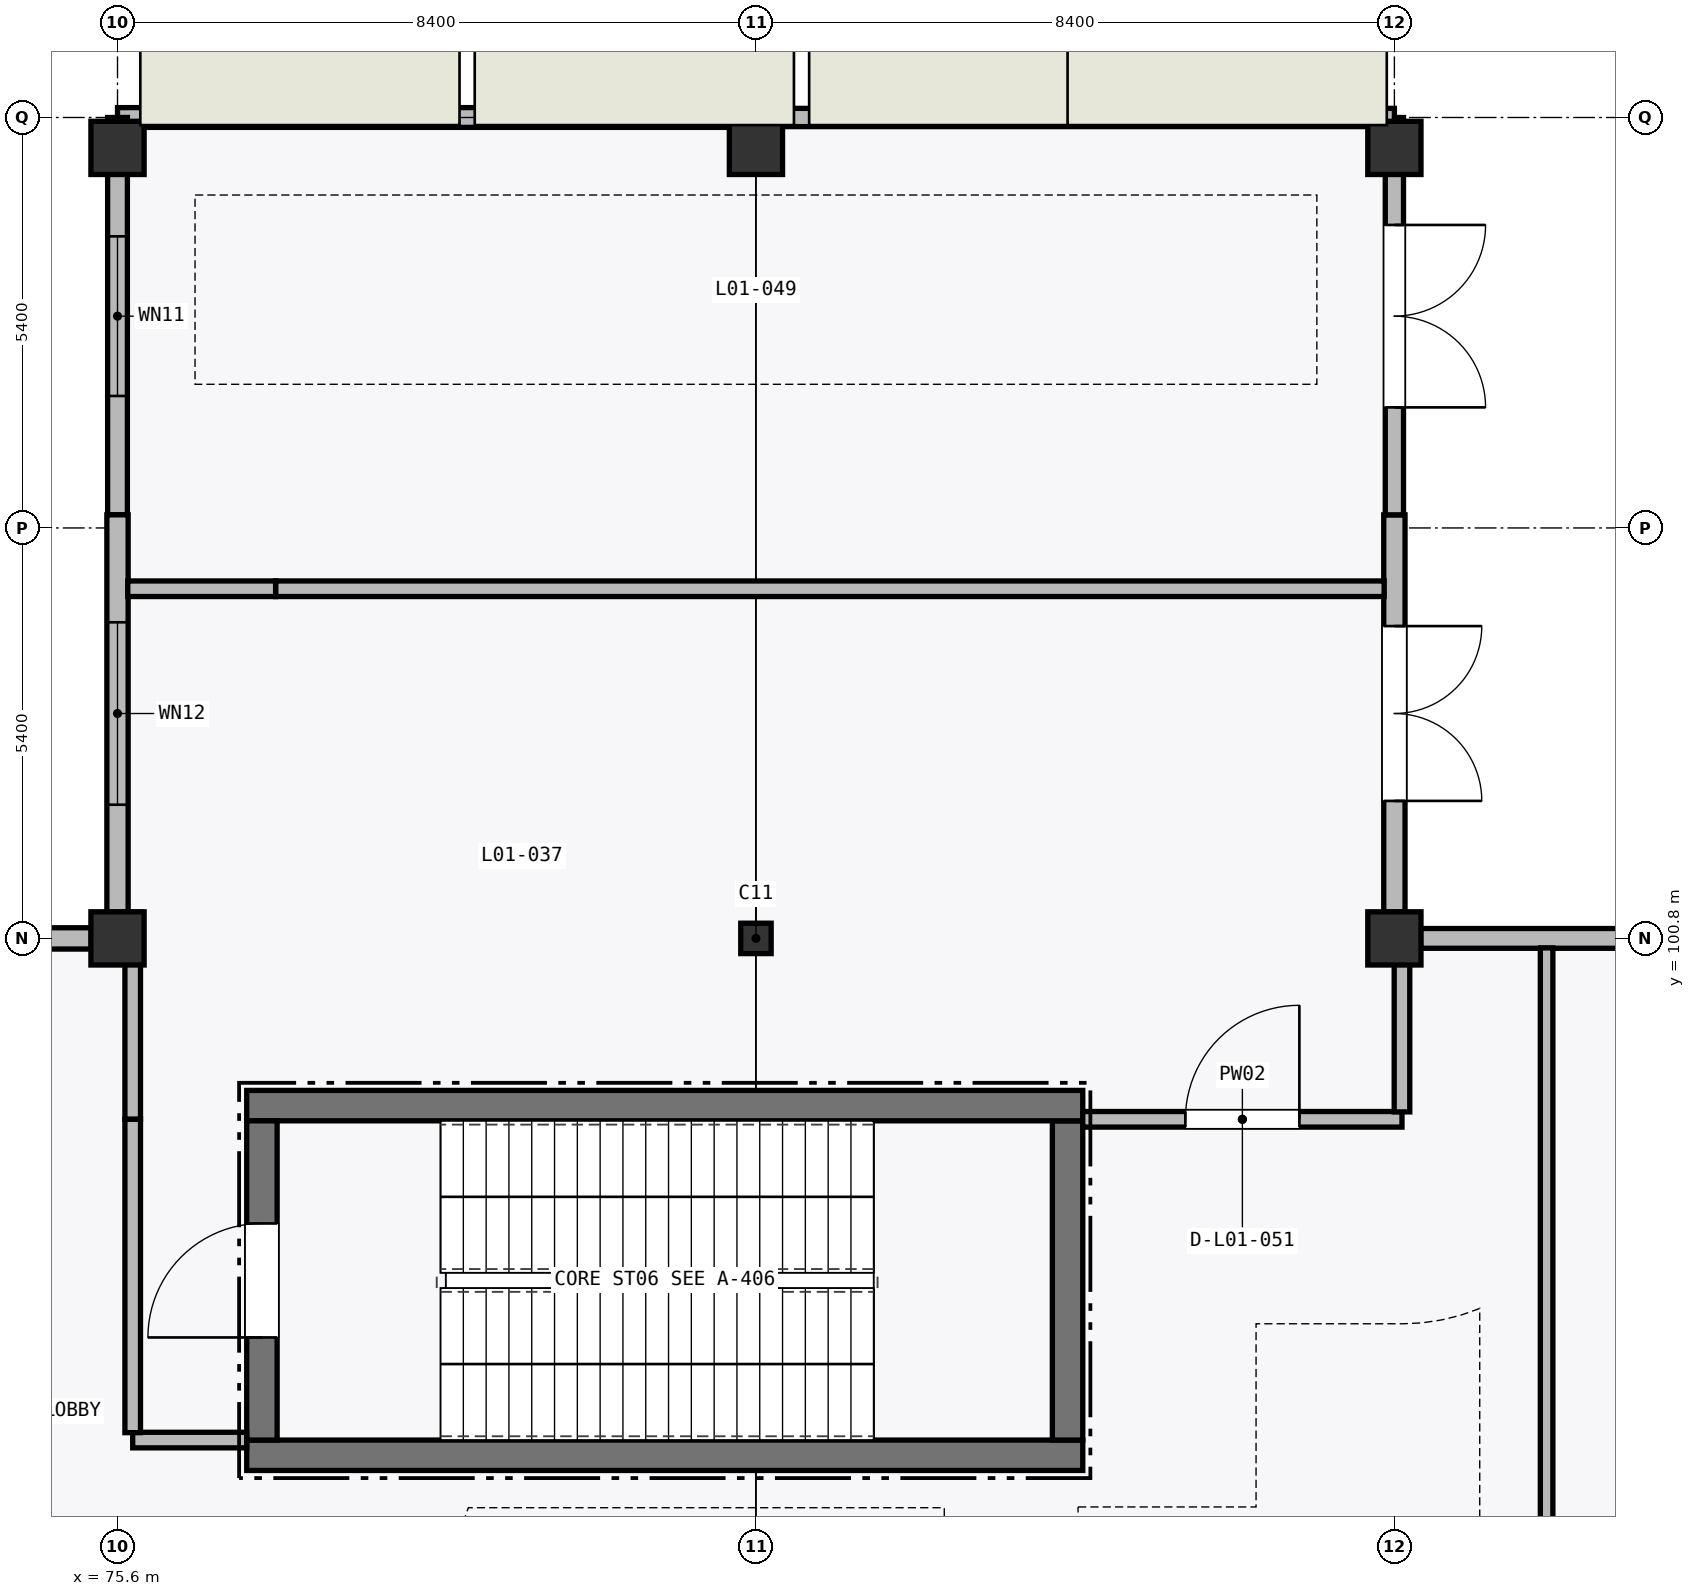
"""IFC4 building model, lengths in metres.
Left out: names, types, materials, properties, quantities, classifications, styles, units other than length and angle.
Written with IfcOpenShell. Run it as: python <this file> out.ifc"""

import sys

from ifc_helpers import new_model, si_unit, direction, frame, frame_2d, origin, origin_2d, place, context, subcontext, project, spatial, rectangle, i_section, extrude, element, fill, save


model = new_model("IFC4")
c1 = context("Model", 3, precision=1e-05, world=origin(), true_north=direction((0.0, 1.0)))
c2 = subcontext(c1, "Body", "Model", "MODEL_VIEW")
j1 = project(units=[si_unit("LENGTHUNIT", "METRE"), si_unit("PLANEANGLEUNIT", "RADIAN")], contexts=[c1])
p1 = place(None, origin())
s1 = spatial("IfcSite", under=j1, at=p1, CompositionType="ELEMENT")
p2 = place(p1, origin())
s2 = spatial("IfcBuilding", under=s1, at=p2, CompositionType="ELEMENT")
p3 = place(p2, origin())
s3 = spatial("IfcBuildingStorey", under=s2, at=p3, CompositionType="ELEMENT", Elevation=0.0)
for number, where, z_axis, x_axis in (
    (1, (75.6, 100.8, 0.0), (0.0, 0.0, 1.0), (1.0, 0.0, 0.0)),
    (2, (75.6, 111.2, 0.0), (0.0, 0.0, 1.0), (1.0, 0.0, 0.0)),
):
    element("IfcColumn", number, at=place(p3, frame(where, z_axis=z_axis, x_axis=x_axis)), inside=s3, PredefinedType="COLUMN", context=c2, shape_type="SweptSolid", body=[
        extrude(rectangle(XDim=0.7, YDim=0.7, at=origin_2d()), origin(), (0.0, 0.0, 1.0), 6.0),
    ])
p4 = place(p3, frame((84.0, 100.8, 0.0), z_axis=(0.0, 0.0, 1.0), x_axis=(1.0, 0.0, 0.0)))
e3 = element("IfcColumn", 3, at=p4, inside=s3, PredefinedType="COLUMN", context=c2, shape_type="SweptSolid", body=[
    extrude(i_section(OverallWidth=0.4, OverallDepth=0.4, WebThickness=0.013, FlangeThickness=0.021, FilletRadius=0.022, at=origin_2d()), origin(), (0.0, 0.0, 1.0), 6.0),
])
for number, where, z_axis, x_axis in (
    (4, (84.0, 111.2, 0.0), (0.0, 0.0, 1.0), (1.0, 0.0, 0.0)),
    (5, (92.4, 100.8, 0.0), (0.0, 0.0, 1.0), (1.0, 0.0, 0.0)),
    (6, (92.4, 111.2, 0.0), (0.0, 0.0, 1.0), (1.0, 0.0, 0.0)),
):
    element("IfcColumn", number, at=place(p3, frame(where, z_axis=z_axis, x_axis=x_axis)), inside=s3, PredefinedType="COLUMN", context=c2, shape_type="SweptSolid", body=[
        extrude(rectangle(XDim=0.7, YDim=0.7, at=origin_2d()), origin(), (0.0, 0.0, 1.0), 6.0),
    ])
p5 = place(p3, frame((100.455, 100.8, 0.0), z_axis=(0.0, 0.0, 1.0), x_axis=(-1.0, 0.0, 0.0)))
e7 = element("IfcWall", 7, at=p5, inside=s3, PredefinedType="STANDARD", context=c2, shape_type="SweptSolid", body=[
    extrude(rectangle(XDim=7.71, YDim=0.26, at=frame_2d((3.855, 0.0))), origin(), (0.0, 0.0, 1.0), 5.231),
])
p6 = place(p5, frame((2.655, 0.0, 0.0)))
e8 = element("IfcOpeningElement", 8, at=p6, cuts=e7, PredefinedType="OPENING", context=c2, shape_type="SweptSolid", body=[
    extrude(rectangle(XDim=2.4, YDim=2.4, at=frame_2d((1.2, 1.2))), frame((0.0, 0.14, 0.0), z_axis=(0.0, -1.0, 0.0), x_axis=(1.0, 0.0, 0.0)), (0.0, 0.0, 1.0), 0.28),
])
p7 = place(p3, frame((92.4, 101.145, 0.0), z_axis=(0.0, 0.0, 1.0), x_axis=(0.0, 1.0, 0.0)))
e9 = element("IfcWall", 9, at=p7, inside=s3, PredefinedType="STANDARD", context=c2, shape_type="SweptSolid", body=[
    extrude(rectangle(XDim=5.228, YDim=0.28, at=frame_2d((2.614, 0.0))), origin(), (0.0, 0.0, 1.0), 5.131),
])
p8 = place(p7, frame((1.464, 0.0, 0.0)))
e10 = element("IfcOpeningElement", 10, at=p8, cuts=e9, PredefinedType="OPENING", context=c2, shape_type="SweptSolid", body=[
    extrude(rectangle(XDim=2.3, YDim=2.4, at=frame_2d((1.15, 1.2))), frame((0.0, 0.15, 0.0), z_axis=(0.0, -1.0, 0.0), x_axis=(1.0, 0.0, 0.0)), (0.0, 0.0, 1.0), 0.3),
])
p9 = place(p3, frame((92.4, 106.373, 0.0), z_axis=(0.0, 0.0, 1.0), x_axis=(0.0, 1.0, 0.0)))
e11 = element("IfcWall", 11, at=p9, inside=s3, PredefinedType="STANDARD", context=c2, shape_type="SweptSolid", body=[
    extrude(rectangle(XDim=5.228, YDim=0.24, at=frame_2d((2.614, 0.0))), origin(), (0.0, 0.0, 1.0), 5.131),
])
p10 = place(p9, frame((1.414, 0.0, 0.0)))
e12 = element("IfcOpeningElement", 12, at=p10, cuts=e11, PredefinedType="OPENING", context=c2, shape_type="SweptSolid", body=[
    extrude(rectangle(XDim=2.4, YDim=2.4, at=frame_2d((1.2, 1.2))), frame((0.0, 0.13, 0.0), z_axis=(0.0, -1.0, 0.0), x_axis=(1.0, 0.0, 0.0)), (0.0, 0.0, 1.0), 0.26),
])
p11 = place(p3, frame((92.4, 111.6, 0.0), z_axis=(0.0, 0.0, 1.0), x_axis=(-1.0, 0.0, 0.0)))
e13 = element("IfcWall", 13, at=p11, inside=s3, PredefinedType="STANDARD", context=c2, shape_type="SweptSolid", body=[
    extrude(rectangle(XDim=8.4, YDim=0.24, at=frame_2d((4.2, 0.0))), origin(), (0.0, 0.0, 1.0), 5.745),
])
p12 = place(p11, frame((3.36, 0.0, 0.95)))
e14 = element("IfcOpeningElement", 14, at=p12, cuts=e13, PredefinedType="OPENING", context=c2, shape_type="SweptSolid", body=[
    extrude(rectangle(XDim=1.68, YDim=2.1, at=frame_2d((0.84, 1.05))), frame((0.0, 0.13, 0.0), z_axis=(0.0, -1.0, 0.0), x_axis=(1.0, 0.0, 0.0)), (0.0, 0.0, 1.0), 0.26),
])
p13 = place(p3, frame((84.0, 111.6, 0.0), z_axis=(0.0, 0.0, 1.0), x_axis=(-1.0, 0.0, 0.0)))
e15 = element("IfcWall", 15, at=p13, inside=s3, PredefinedType="STANDARD", context=c2, shape_type="SweptSolid", body=[
    extrude(rectangle(XDim=8.4, YDim=0.26, at=frame_2d((4.2, 0.0))), origin(), (0.0, 0.0, 1.0), 5.297),
])
p14 = place(p13, frame((3.3, 0.0, 0.95)))
e16 = element("IfcOpeningElement", 16, at=p14, cuts=e15, PredefinedType="OPENING", context=c2, shape_type="SweptSolid", body=[
    extrude(rectangle(XDim=1.8, YDim=2.1, at=frame_2d((0.9, 1.05))), frame((0.0, 0.14, 0.0), z_axis=(0.0, -1.0, 0.0), x_axis=(1.0, 0.0, 0.0)), (0.0, 0.0, 1.0), 0.28),
])
p15 = place(p3, frame((75.6, 111.6, 0.0), z_axis=(0.0, 0.0, 1.0), x_axis=(0.0, -1.0, 0.0)))
e17 = element("IfcWall", 17, at=p15, inside=s3, PredefinedType="STANDARD", context=c2, shape_type="SweptSolid", body=[
    extrude(rectangle(XDim=5.228, YDim=0.26, at=frame_2d((2.614, 0.0))), origin(), (0.0, 0.0, 1.0), 5.131),
])
p16 = place(p15, frame((1.564, 0.0, 0.95)))
e18 = element("IfcOpeningElement", 18, at=p16, cuts=e17, PredefinedType="OPENING", context=c2, shape_type="SweptSolid", body=[
    extrude(rectangle(XDim=2.1, YDim=2.1, at=frame_2d((1.05, 1.05))), frame((0.0, 0.14, 0.0), z_axis=(0.0, -1.0, 0.0), x_axis=(1.0, 0.0, 0.0)), (0.0, 0.0, 1.0), 0.28),
])
p17 = place(p3, frame((75.6, 106.373, 0.0), z_axis=(0.0, 0.0, 1.0), x_axis=(0.0, -1.0, 0.0)))
e19 = element("IfcWall", 19, at=p17, inside=s3, PredefinedType="STANDARD", context=c2, shape_type="SweptSolid", body=[
    extrude(rectangle(XDim=5.228, YDim=0.28, at=frame_2d((2.614, 0.0))), origin(), (0.0, 0.0, 1.0), 5.131),
])
p18 = place(p17, frame((1.414, 0.0, 0.95)))
e20 = element("IfcOpeningElement", 20, at=p18, cuts=e19, PredefinedType="OPENING", context=c2, shape_type="SweptSolid", body=[
    extrude(rectangle(XDim=2.4, YDim=2.1, at=frame_2d((1.2, 1.05))), frame((0.0, 0.15, 0.0), z_axis=(0.0, -1.0, 0.0), x_axis=(1.0, 0.0, 0.0)), (0.0, 0.0, 1.0), 0.3),
])
p19 = place(p3, frame((75.255, 100.8, 0.0), z_axis=(0.0, 0.0, 1.0), x_axis=(-1.0, 0.0, 0.0)))
e21 = element("IfcWall", 21, at=p19, inside=s3, PredefinedType="STANDARD", context=c2, shape_type="SweptSolid", body=[
    extrude(rectangle(XDim=7.71, YDim=0.28, at=frame_2d((3.855, 0.0))), origin(), (0.0, 0.0, 1.0), 5.437),
])
p20 = place(p19, frame((3.255, 0.0, 0.95)))
e22 = element("IfcOpeningElement", 22, at=p20, cuts=e21, PredefinedType="OPENING", context=c2, shape_type="SweptSolid", body=[
    extrude(rectangle(XDim=1.2, YDim=2.4, at=frame_2d((0.6, 1.2))), frame((0.0, 0.15, 0.0), z_axis=(0.0, -1.0, 0.0), x_axis=(1.0, 0.0, 0.0)), (0.0, 0.0, 1.0), 0.3),
])
p21 = place(p3, frame((77.3, 94.0, 0.0), z_axis=(0.0, 0.0, 1.0), x_axis=(1.0, 0.0, 0.0)))
e23 = element("IfcWall", 23, at=p21, inside=s3, PredefinedType="SHEAR", context=c2, shape_type="SweptSolid", body=[
    extrude(rectangle(XDim=11.0, YDim=0.4, at=frame_2d((5.5, 0.0))), origin(), (0.0, 0.0, 1.0), 5.745),
])
p22 = place(p3, frame((88.1, 94.2, 0.0), z_axis=(0.0, 0.0, 1.0), x_axis=(0.0, 1.0, 0.0)))
e24 = element("IfcWall", 24, at=p22, inside=s3, PredefinedType="SHEAR", context=c2, shape_type="SweptSolid", body=[
    extrude(rectangle(XDim=4.2, YDim=0.4, at=frame_2d((2.1, 0.0))), origin(), (0.0, 0.0, 1.0), 5.745),
])
p23 = place(p3, frame((88.3, 98.6, 0.0), z_axis=(0.0, 0.0, 1.0), x_axis=(-1.0, 0.0, 0.0)))
e25 = element("IfcWall", 25, at=p23, inside=s3, PredefinedType="SHEAR", context=c2, shape_type="SweptSolid", body=[
    extrude(rectangle(XDim=11.0, YDim=0.4, at=frame_2d((5.5, 0.0))), origin(), (0.0, 0.0, 1.0), 5.745),
])
p24 = place(p3, frame((77.5, 98.4, 0.0), z_axis=(0.0, 0.0, 1.0), x_axis=(0.0, -1.0, 0.0)))
e26 = element("IfcWall", 26, at=p24, inside=s3, PredefinedType="SHEAR", context=c2, shape_type="SweptSolid", body=[
    extrude(rectangle(XDim=4.2, YDim=0.4, at=frame_2d((2.1, 0.0))), origin(), (0.0, 0.0, 1.0), 5.745),
])
p25 = place(p24, frame((1.35, 0.0, 0.0)))
e27 = element("IfcOpeningElement", 27, at=p25, cuts=e26, PredefinedType="OPENING", context=c2, shape_type="SweptSolid", body=[
    extrude(rectangle(XDim=1.5, YDim=2.15, at=frame_2d((0.75, 1.075))), frame((0.0, 0.21, 0.0), z_axis=(0.0, -1.0, 0.0), x_axis=(1.0, 0.0, 0.0)), (0.0, 0.0, 1.0), 0.42),
])
p26 = place(p3, frame((75.8, 94.2, 0.0), z_axis=(0.0, 0.0, 1.0), x_axis=(1.0, 0.0, 0.0)))
e28 = element("IfcWall", 28, at=p26, inside=s3, PredefinedType="PARTITIONING", context=c2, shape_type="SweptSolid", body=[
    extrude(rectangle(XDim=1.5, YDim=0.205, at=frame_2d((0.75, 0.0))), origin(), (0.0, 0.0, 1.0), 5.745),
])
p27 = place(p3, frame((88.3, 98.42, 0.0), z_axis=(0.0, 0.0, 1.0), x_axis=(1.0, 0.0, 0.0)))
e29 = element("IfcWall", 29, at=p27, inside=s3, PredefinedType="PARTITIONING", context=c2, shape_type="SweptSolid", body=[
    extrude(rectangle(XDim=4.2, YDim=0.205, at=frame_2d((2.1, 0.0))), origin(), (0.0, 0.0, 1.0), 5.745),
])
p28 = place(p27, frame((1.35, 0.0, 0.0)))
e30 = element("IfcOpeningElement", 30, at=p28, cuts=e29, PredefinedType="OPENING", context=c2, shape_type="SweptSolid", body=[
    extrude(rectangle(XDim=1.5, YDim=2.15, at=frame_2d((0.75, 1.075))), frame((0.0, 0.113, 0.0), z_axis=(0.0, -1.0, 0.0), x_axis=(1.0, 0.0, 0.0)), (0.0, 0.0, 1.0), 0.225),
])
p29 = place(p3, frame((92.5, 98.518, 0.0), z_axis=(0.0, 0.0, 1.0), x_axis=(0.0, 1.0, 0.0)))
e31 = element("IfcWall", 31, at=p29, inside=s3, PredefinedType="PARTITIONING", context=c2, shape_type="SweptSolid", body=[
    extrude(rectangle(XDim=2.362, YDim=0.205, at=frame_2d((1.181, 0.0))), origin(), (0.0, 0.0, 1.0), 4.937),
])
p30 = place(p3, frame((92.265, 105.4, 0.0), z_axis=(0.0, 0.0, 1.0), x_axis=(-1.0, 0.0, 0.0)))
e32 = element("IfcWall", 32, at=p30, inside=s3, PredefinedType="PARTITIONING", context=c2, shape_type="SweptSolid", body=[
    extrude(rectangle(XDim=14.585, YDim=0.205, at=frame_2d((7.292, 0.0))), origin(), (0.0, 0.0, 1.0), 5.745),
])
p31 = place(p3, frame((77.68, 105.4, 0.0), z_axis=(0.0, 0.0, 1.0), x_axis=(-1.0, 0.0, 0.0)))
e33 = element("IfcWall", 33, at=p31, inside=s3, PredefinedType="PARTITIONING", context=c2, shape_type="SweptSolid", body=[
    extrude(rectangle(XDim=1.945, YDim=0.205, at=frame_2d((0.972, 0.0))), origin(), (0.0, 0.0, 1.0), 5.745),
])
p32 = place(p3, frame((75.8, 101.145, 0.0), z_axis=(0.0, 0.0, 1.0), x_axis=(0.0, -1.0, 0.0)))
e34 = element("IfcWall", 34, at=p32, inside=s3, PredefinedType="PARTITIONING", context=c2, shape_type="SweptSolid", body=[
    extrude(rectangle(XDim=2.725, YDim=0.205, at=frame_2d((1.363, 0.0))), origin(), (0.0, 0.0, 1.0), 4.937),
])
p33 = place(p3, frame((75.8, 98.42, 0.0), z_axis=(0.0, 0.0, 1.0), x_axis=(0.0, -1.0, 0.0)))
e35 = element("IfcWall", 35, at=p33, inside=s3, PredefinedType="PARTITIONING", context=c2, shape_type="SweptSolid", body=[
    extrude(rectangle(XDim=4.122, YDim=0.205, at=frame_2d((2.061, 0.0))), origin(), (0.0, 0.0, 1.0), 4.937),
])
p34 = place(p3, frame((94.403, 100.675, 0.0), z_axis=(0.0, 0.0, 1.0), x_axis=(0.0, -1.0, 0.0)))
e36 = element("IfcWall", 36, at=p34, inside=s3, PredefinedType="PARTITIONING", context=c2, shape_type="SweptSolid", body=[
    extrude(rectangle(XDim=12.032, YDim=0.165, at=frame_2d((6.016, 0.0))), origin(), (0.0, 0.0, 1.0), 5.745),
])
p35 = place(p8, frame((2.3, 0.0, 0.0), z_axis=(0.0, 0.0, 1.0), x_axis=(-1.0, 0.0, 0.0)))
e37 = element("IfcDoor", 37, at=p35, inside=s3, OperationType="DOUBLE_DOOR_SINGLE_SWING", PredefinedType="DOOR", context=c2, shape_type="SweptSolid", body=[
    extrude(rectangle(XDim=2.3, YDim=2.4, at=frame_2d((1.15, 1.2))), frame((0.0, 0.025, 0.0), z_axis=(0.0, -1.0, 0.0), x_axis=(1.0, 0.0, 0.0)), (0.0, 0.0, 1.0), 0.05),
])
fill(e10, e37)
p36 = place(p10, frame((2.4, 0.0, 0.0), z_axis=(0.0, 0.0, 1.0), x_axis=(-1.0, 0.0, 0.0)))
e38 = element("IfcDoor", 38, at=p36, inside=s3, OperationType="DOUBLE_DOOR_SINGLE_SWING", PredefinedType="DOOR", context=c2, shape_type="SweptSolid", body=[
    extrude(rectangle(XDim=2.4, YDim=2.4, at=frame_2d((1.2, 1.2))), frame((0.0, 0.025, 0.0), z_axis=(0.0, -1.0, 0.0), x_axis=(1.0, 0.0, 0.0)), (0.0, 0.0, 1.0), 0.05),
])
fill(e12, e38)
p37 = place(p12, origin())
e39 = element("IfcWindow", 39, at=p37, inside=s3, PartitioningType="SINGLE_PANEL", PredefinedType="WINDOW", context=c2, shape_type="SweptSolid", body=[
    extrude(rectangle(XDim=1.68, YDim=2.1, at=frame_2d((0.84, 1.05))), frame((0.0, 0.03, 0.0), z_axis=(0.0, -1.0, 0.0), x_axis=(1.0, 0.0, 0.0)), (0.0, 0.0, 1.0), 0.06),
])
fill(e14, e39)
p38 = place(p14, origin())
e40 = element("IfcWindow", 40, at=p38, inside=s3, PartitioningType="SINGLE_PANEL", PredefinedType="WINDOW", context=c2, shape_type="SweptSolid", body=[
    extrude(rectangle(XDim=1.8, YDim=2.1, at=frame_2d((0.9, 1.05))), frame((0.0, 0.03, 0.0), z_axis=(0.0, -1.0, 0.0), x_axis=(1.0, 0.0, 0.0)), (0.0, 0.0, 1.0), 0.06),
])
fill(e16, e40)
p39 = place(p16, origin())
e41 = element("IfcWindow", 41, at=p39, inside=s3, PartitioningType="SINGLE_PANEL", PredefinedType="WINDOW", context=c2, shape_type="SweptSolid", body=[
    extrude(rectangle(XDim=2.1, YDim=2.1, at=frame_2d((1.05, 1.05))), frame((0.0, 0.03, 0.0), z_axis=(0.0, -1.0, 0.0), x_axis=(1.0, 0.0, 0.0)), (0.0, 0.0, 1.0), 0.06),
])
fill(e18, e41)
p40 = place(p18, origin())
e42 = element("IfcWindow", 42, at=p40, inside=s3, PartitioningType="SINGLE_PANEL", PredefinedType="WINDOW", context=c2, shape_type="SweptSolid", body=[
    extrude(rectangle(XDim=2.4, YDim=2.1, at=frame_2d((1.2, 1.05))), frame((0.0, 0.03, 0.0), z_axis=(0.0, -1.0, 0.0), x_axis=(1.0, 0.0, 0.0)), (0.0, 0.0, 1.0), 0.06),
])
fill(e20, e42)
p41 = place(p25, frame((1.5, 0.0, 0.0), z_axis=(0.0, 0.0, 1.0), x_axis=(-1.0, 0.0, 0.0)))
e43 = element("IfcDoor", 43, at=p41, inside=s3, OperationType="SINGLE_SWING_RIGHT", PredefinedType="DOOR", context=c2, shape_type="SweptSolid", body=[
    extrude(rectangle(XDim=1.5, YDim=2.15, at=frame_2d((0.75, 1.075))), frame((0.0, 0.025, 0.0), z_axis=(0.0, -1.0, 0.0), x_axis=(1.0, 0.0, 0.0)), (0.0, 0.0, 1.0), 0.05),
])
fill(e27, e43)
p42 = place(p28, origin())
e44 = element("IfcDoor", 44, at=p42, inside=s3, OperationType="SINGLE_SWING_RIGHT", PredefinedType="DOOR", context=c2, shape_type="SweptSolid", body=[
    extrude(rectangle(XDim=1.5, YDim=2.15, at=frame_2d((0.75, 1.075))), frame((0.0, 0.025, 0.0), z_axis=(0.0, -1.0, 0.0), x_axis=(1.0, 0.0, 0.0)), (0.0, 0.0, 1.0), 0.05),
])
fill(e30, e44)
save(model, sys.argv[1])
